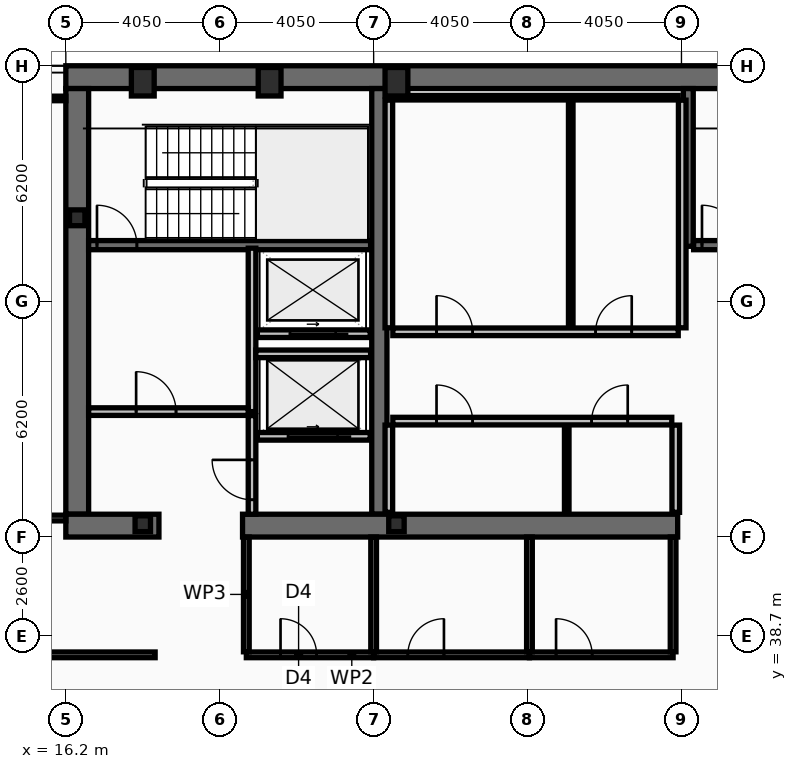
"""IFC4 building model, lengths in metres.
Left out: names, types, materials, properties, quantities, classifications, styles, units other than length and angle.
Written with IfcOpenShell. Run it as: python <this file> out.ifc"""

import sys

from ifc_helpers import new_model, si_unit, direction, frame, frame_2d, origin, origin_2d, place, context, subcontext, project, spatial, rectangle, hollow_rectangle, i_section, extrude, element, fill, save


model = new_model("IFC4")
c1 = context("Model", 3, precision=1e-05, world=origin(), true_north=direction((0.0, 1.0)))
c2 = subcontext(c1, "Body", "Model", "MODEL_VIEW")
j1 = project(units=[si_unit("LENGTHUNIT", "METRE"), si_unit("PLANEANGLEUNIT", "RADIAN")], contexts=[c1])
p1 = place(None, origin())
s1 = spatial("IfcSite", under=j1, at=p1, CompositionType="ELEMENT")
p2 = place(p1, origin())
s2 = spatial("IfcBuilding", under=s1, at=p2, CompositionType="ELEMENT")
p3 = place(p2, frame((0.0, 0.0, 221.0)))
s3 = spatial("IfcBuildingStorey", under=s2, at=p3, CompositionType="ELEMENT", Elevation=221.0)
p4 = place(p3, frame((16.2, 53.4, 0.0), z_axis=(0.0, 0.0, 1.0), x_axis=(1.0, 0.0, 0.0)))
e1 = element("IfcWall", 1, at=p4, inside=s3, PredefinedType="SHEAR", context=c2, shape_type="SweptSolid", body=[
    extrude(rectangle(XDim=40.5, YDim=0.6, at=frame_2d((20.25, 0.0))), origin(), (0.0, 0.0, 1.0), 3.44),
])
p5 = place(p3, frame((16.5, 41.9, 0.0), z_axis=(0.0, 0.0, 1.0), x_axis=(0.0, 1.0, 0.0)))
e2 = element("IfcWall", 2, at=p5, inside=s3, PredefinedType="SHEAR", context=c2, shape_type="SweptSolid", body=[
    extrude(rectangle(XDim=11.2, YDim=0.6, at=frame_2d((5.6, 0.0))), origin(), (0.0, 0.0, 1.0), 3.44),
])
p6 = place(p3, frame((24.45, 41.9, 0.0), z_axis=(0.0, 0.0, 1.0), x_axis=(0.0, 1.0, 0.0)))
e3 = element("IfcWall", 3, at=p6, inside=s3, PredefinedType="SHEAR", context=c2, shape_type="SweptSolid", body=[
    extrude(rectangle(XDim=11.2, YDim=0.4, at=frame_2d((5.6, 0.0))), origin(), (0.0, 0.0, 1.0), 3.44),
])
p7 = place(p3, frame((18.65, 41.6, 0.0), z_axis=(0.0, 0.0, 1.0), x_axis=(-1.0, 0.0, 0.0)))
e4 = element("IfcWall", 4, at=p7, inside=s3, PredefinedType="SHEAR", context=c2, shape_type="SweptSolid", body=[
    extrude(rectangle(XDim=2.45, YDim=0.6, at=frame_2d((1.225, 0.0))), origin(), (0.0, 0.0, 1.0), 3.44),
])
p8 = place(p3, frame((32.3, 41.6, 0.0), z_axis=(0.0, 0.0, 1.0), x_axis=(-1.0, 0.0, 0.0)))
e5 = element("IfcWall", 5, at=p8, inside=s3, PredefinedType="SHEAR", context=c2, shape_type="SweptSolid", body=[
    extrude(rectangle(XDim=11.45, YDim=0.6, at=frame_2d((5.725, 0.0))), origin(), (0.0, 0.0, 1.0), 3.44),
])
p9 = place(p3, frame((32.58, 48.95, 0.0), z_axis=(0.0, 0.0, 1.0), x_axis=(0.0, 1.0, 0.0)))
e6 = element("IfcWall", 6, at=p9, inside=s3, PredefinedType="SHEAR", context=c2, shape_type="SweptSolid", body=[
    extrude(rectangle(XDim=4.15, YDim=0.26, at=frame_2d((2.075, 0.0))), origin(), (0.0, 0.0, 1.0), 3.44),
])
p10 = place(p3, frame((16.8, 48.98, 0.0), z_axis=(0.0, 0.0, 1.0), x_axis=(1.0, 0.0, 0.0)))
e7 = element("IfcWall", 7, at=p10, inside=s3, PredefinedType="SHEAR", context=c2, shape_type="SweptSolid", body=[
    extrude(rectangle(XDim=7.42, YDim=0.24, at=frame_2d((3.71, 0.0))), origin(), (0.0, 0.0, 1.0), 3.44),
])
p11 = place(p10, frame((0.22, 0.0, 0.0)))
e8 = element("IfcOpeningElement", 8, at=p11, cuts=e7, PredefinedType="OPENING", context=c2, shape_type="SweptSolid", body=[
    extrude(rectangle(XDim=1.05, YDim=2.15, at=frame_2d((0.525, 1.075))), frame((0.0, 0.13, 0.0), z_axis=(0.0, -1.0, 0.0), x_axis=(1.0, 0.0, 0.0)), (0.0, 0.0, 1.0), 0.26),
])
p12 = place(p3, frame((32.72, 48.98, 0.0), z_axis=(0.0, 0.0, 1.0), x_axis=(1.0, 0.0, 0.0)))
e9 = element("IfcWall", 9, at=p12, inside=s3, PredefinedType="SHEAR", context=c2, shape_type="SweptSolid", body=[
    extrude(rectangle(XDim=7.56, YDim=0.24, at=frame_2d((3.78, 0.0))), origin(), (0.0, 0.0, 1.0), 3.44),
])
p13 = place(p12, frame((0.22, 0.0, 0.0)))
e10 = element("IfcOpeningElement", 10, at=p13, cuts=e9, PredefinedType="OPENING", context=c2, shape_type="SweptSolid", body=[
    extrude(rectangle(XDim=1.05, YDim=2.15, at=frame_2d((0.525, 1.075))), frame((0.0, 0.13, 0.0), z_axis=(0.0, -1.0, 0.0), x_axis=(1.0, 0.0, 0.0)), (0.0, 0.0, 1.0), 0.26),
])
for number, where, z_axis, x_axis in (
    (11, (18.225, 53.28, 0.0), (0.0, 0.0, 1.0), (1.0, 0.0, 0.0)),
    (12, (21.562, 53.28, 0.0), (0.0, 0.0, 1.0), (1.0, 0.0, 0.0)),
    (13, (24.9, 53.28, 0.0), (0.0, 0.0, 1.0), (1.0, 0.0, 0.0)),
):
    element("IfcColumn", number, at=place(p3, frame(where, z_axis=z_axis, x_axis=x_axis)), inside=s3, PredefinedType="COLUMN", context=c2, shape_type="SweptSolid", body=[
        extrude(hollow_rectangle(XDim=0.6, YDim=0.75, WallThickness=0.045, at=origin_2d()), origin(), (0.0, 0.0, 1.0), 3.6),
    ])
for number, where, z_axis, x_axis in (
    (14, (16.5, 49.7, 0.0), (0.0, 0.0, 1.0), (1.0, 0.0, 0.0)),
    (15, (18.225, 41.65, 0.0), (0.0, 0.0, 1.0), (1.0, 0.0, 0.0)),
    (16, (24.9, 41.65, 0.0), (0.0, 0.0, 1.0), (1.0, 0.0, 0.0)),
):
    element("IfcColumn", number, at=place(p3, frame(where, z_axis=z_axis, x_axis=x_axis)), inside=s3, PredefinedType="COLUMN", context=c2, shape_type="SweptSolid", body=[
        extrude(i_section(OverallWidth=0.406, OverallDepth=0.416, WebThickness=0.03, FlangeThickness=0.048, at=origin_2d()), origin(), (0.0, 0.0, 1.0), 3.6),
    ])
p14 = place(p3, frame((24.21, 43.95, 0.0), z_axis=(0.0, 0.0, 1.0), x_axis=(-1.0, 0.0, 0.0)))
e17 = element("IfcWall", 17, at=p14, inside=s3, PredefinedType="PARTITIONING", context=c2, shape_type="SweptSolid", body=[
    extrude(rectangle(XDim=2.97, YDim=0.2, at=frame_2d((1.485, 0.0))), origin(), (0.0, 0.0, 1.0), 3.44),
])
p15 = place(p14, frame((0.86, 0.0, 0.0)))
e18 = element("IfcOpeningElement", 18, at=p15, cuts=e17, PredefinedType="OPENING", context=c2, shape_type="SweptSolid", body=[
    extrude(rectangle(XDim=1.3, YDim=2.18, at=frame_2d((0.65, 1.09))), frame((0.0, 0.11, 0.0), z_axis=(0.0, -1.0, 0.0), x_axis=(1.0, 0.0, 0.0)), (0.0, 0.0, 1.0), 0.22),
])
p16 = place(p3, frame((24.21, 46.65, 0.0), z_axis=(0.0, 0.0, 1.0), x_axis=(-1.0, 0.0, 0.0)))
e19 = element("IfcWall", 19, at=p16, inside=s3, PredefinedType="PARTITIONING", context=c2, shape_type="SweptSolid", body=[
    extrude(rectangle(XDim=2.97, YDim=0.2, at=frame_2d((1.485, 0.0))), origin(), (0.0, 0.0, 1.0), 3.44),
])
p17 = place(p16, frame((0.91, 0.0, 0.0)))
e20 = element("IfcOpeningElement", 20, at=p17, cuts=e19, PredefinedType="OPENING", context=c2, shape_type="SweptSolid", body=[
    extrude(rectangle(XDim=1.2, YDim=2.18, at=frame_2d((0.6, 1.09))), frame((0.0, 0.11, 0.0), z_axis=(0.0, -1.0, 0.0), x_axis=(1.0, 0.0, 0.0)), (0.0, 0.0, 1.0), 0.22),
])
p18 = place(p3, frame((21.1, 44.6, 0.0), z_axis=(0.0, 0.0, 1.0), x_axis=(0.0, 1.0, 0.0)))
e21 = element("IfcWall", 21, at=p18, inside=s3, PredefinedType="PARTITIONING", context=c2, shape_type="SweptSolid", body=[
    extrude(rectangle(XDim=4.3, YDim=0.2, at=frame_2d((2.15, 0.0))), origin(), (0.0, 0.0, 1.0), 3.44),
])
p19 = place(p3, frame((16.8, 44.6, 0.0), z_axis=(0.0, 0.0, 1.0), x_axis=(1.0, 0.0, 0.0)))
e22 = element("IfcWall", 22, at=p19, inside=s3, PredefinedType="PARTITIONING", context=c2, shape_type="SweptSolid", body=[
    extrude(rectangle(XDim=4.2, YDim=0.2, at=frame_2d((2.1, 0.0))), origin(), (0.0, 0.0, 1.0), 3.44),
])
p20 = place(p19, frame((1.25, 0.0, 0.0)))
e23 = element("IfcOpeningElement", 23, at=p20, cuts=e22, PredefinedType="OPENING", context=c2, shape_type="SweptSolid", body=[
    extrude(rectangle(XDim=1.05, YDim=2.15, at=frame_2d((0.525, 1.075))), frame((0.0, 0.11, 0.0), z_axis=(0.0, -1.0, 0.0), x_axis=(1.0, 0.0, 0.0)), (0.0, 0.0, 1.0), 0.22),
])
p21 = place(p3, frame((21.2, 46.12, 0.0), z_axis=(0.0, 0.0, 1.0), x_axis=(1.0, 0.0, 0.0)))
e24 = element("IfcWall", 24, at=p21, inside=s3, PredefinedType="PARTITIONING", context=c2, shape_type="SweptSolid", body=[
    extrude(rectangle(XDim=3.02, YDim=0.2, at=frame_2d((1.51, 0.0))), origin(), (0.0, 0.0, 1.0), 3.44),
])
p22 = place(p3, frame((21.1, 41.9, 0.0), z_axis=(0.0, 0.0, 1.0), x_axis=(0.0, 1.0, 0.0)))
e25 = element("IfcWall", 25, at=p22, inside=s3, PredefinedType="PARTITIONING", context=c2, shape_type="SweptSolid", body=[
    extrude(rectangle(XDim=2.595, YDim=0.2, at=frame_2d((1.298, 0.0))), origin(), (0.0, 0.0, 1.0), 3.44),
])
p23 = place(p22, frame((0.38, 0.0, 0.0)))
e26 = element("IfcOpeningElement", 26, at=p23, cuts=e25, PredefinedType="OPENING", context=c2, shape_type="SweptSolid", body=[
    extrude(rectangle(XDim=1.05, YDim=2.15, at=frame_2d((0.525, 1.075))), frame((0.0, 0.11, 0.0), z_axis=(0.0, -1.0, 0.0), x_axis=(1.0, 0.0, 0.0)), (0.0, 0.0, 1.0), 0.22),
])
for number, where, z_axis, x_axis in (
    (27, (24.7, 46.805, 0.0), (0.0, 0.0, 1.0), (0.0, 1.0, 0.0)),
    (28, (32.42, 46.805, 0.0), (0.0, 0.0, 1.0), (0.0, 1.0, 0.0)),
):
    element("IfcWall", number, at=place(p3, frame(where, z_axis=z_axis, x_axis=x_axis)), inside=s3, PredefinedType="PARTITIONING", context=c2, shape_type="SweptSolid", body=[
        extrude(rectangle(XDim=5.99, YDim=0.2, at=frame_2d((2.995, 0.0))), origin(), (0.0, 0.0, 1.0), 3.44),
    ])
p24 = place(p3, frame((24.805, 52.86, 0.0), z_axis=(0.0, 0.0, 1.0), x_axis=(1.0, 0.0, 0.0)))
e29 = element("IfcWall", 29, at=p24, inside=s3, PredefinedType="PARTITIONING", context=c2, shape_type="SweptSolid", body=[
    extrude(rectangle(XDim=7.51, YDim=0.12, at=frame_2d((3.755, 0.0))), origin(), (0.0, 0.0, 1.0), 3.44),
])
p25 = place(p3, frame((29.486, 46.805, 0.0), z_axis=(0.0, 0.0, 1.0), x_axis=(0.0, 1.0, 0.0)))
e30 = element("IfcWall", 30, at=p25, inside=s3, PredefinedType="PARTITIONING", context=c2, shape_type="SweptSolid", body=[
    extrude(rectangle(XDim=5.99, YDim=0.12, at=frame_2d((2.995, 0.0))), origin(), (0.0, 0.0, 1.0), 3.44),
])
p26 = place(p3, frame((24.805, 46.7, 0.0), z_axis=(0.0, 0.0, 1.0), x_axis=(1.0, 0.0, 0.0)))
e31 = element("IfcWall", 31, at=p26, inside=s3, PredefinedType="PARTITIONING", context=c2, shape_type="SweptSolid", body=[
    extrude(rectangle(XDim=7.51, YDim=0.2, at=frame_2d((3.755, 0.0))), origin(), (0.0, 0.0, 1.0), 3.44),
])
p27 = place(p26, frame((1.15, 0.0, 0.0)))
e32 = element("IfcOpeningElement", 32, at=p27, cuts=e31, PredefinedType="OPENING", context=c2, shape_type="SweptSolid", body=[
    extrude(rectangle(XDim=0.95, YDim=2.1, at=frame_2d((0.475, 1.05))), frame((0.0, 0.11, 0.0), z_axis=(0.0, -1.0, 0.0), x_axis=(1.0, 0.0, 0.0)), (0.0, 0.0, 1.0), 0.22),
])
p28 = place(p26, frame((5.336, 0.0, 0.0)))
e33 = element("IfcOpeningElement", 33, at=p28, cuts=e31, PredefinedType="OPENING", context=c2, shape_type="SweptSolid", body=[
    extrude(rectangle(XDim=0.95, YDim=2.1, at=frame_2d((0.475, 1.05))), frame((0.0, 0.11, 0.0), z_axis=(0.0, -1.0, 0.0), x_axis=(1.0, 0.0, 0.0)), (0.0, 0.0, 1.0), 0.22),
])
for number, where, z_axis, x_axis in (
    (34, (24.7, 41.95, 0.0), (0.0, 0.0, 1.0), (0.0, 1.0, 0.0)),
    (35, (32.25, 41.95, 0.0), (0.0, 0.0, 1.0), (0.0, 1.0, 0.0)),
):
    element("IfcWall", number, at=place(p3, frame(where, z_axis=z_axis, x_axis=x_axis)), inside=s3, PredefinedType="PARTITIONING", context=c2, shape_type="SweptSolid", body=[
        extrude(rectangle(XDim=2.295, YDim=0.2, at=frame_2d((1.147, 0.0))), origin(), (0.0, 0.0, 1.0), 3.44),
    ])
p29 = place(p3, frame((29.381, 41.95, 0.0), z_axis=(0.0, 0.0, 1.0), x_axis=(0.0, 1.0, 0.0)))
e36 = element("IfcWall", 36, at=p29, inside=s3, PredefinedType="PARTITIONING", context=c2, shape_type="SweptSolid", body=[
    extrude(rectangle(XDim=2.295, YDim=0.12, at=frame_2d((1.147, 0.0))), origin(), (0.0, 0.0, 1.0), 3.44),
])
p30 = place(p3, frame((24.805, 44.35, 0.0), z_axis=(0.0, 0.0, 1.0), x_axis=(1.0, 0.0, 0.0)))
e37 = element("IfcWall", 37, at=p30, inside=s3, PredefinedType="PARTITIONING", context=c2, shape_type="SweptSolid", body=[
    extrude(rectangle(XDim=7.34, YDim=0.2, at=frame_2d((3.67, 0.0))), origin(), (0.0, 0.0, 1.0), 3.44),
])
p31 = place(p30, frame((1.15, 0.0, 0.0)))
e38 = element("IfcOpeningElement", 38, at=p31, cuts=e37, PredefinedType="OPENING", context=c2, shape_type="SweptSolid", body=[
    extrude(rectangle(XDim=0.95, YDim=2.1, at=frame_2d((0.475, 1.05))), frame((0.0, 0.11, 0.0), z_axis=(0.0, -1.0, 0.0), x_axis=(1.0, 0.0, 0.0)), (0.0, 0.0, 1.0), 0.22),
])
p32 = place(p30, frame((5.231, 0.0, 0.0)))
e39 = element("IfcOpeningElement", 39, at=p32, cuts=e37, PredefinedType="OPENING", context=c2, shape_type="SweptSolid", body=[
    extrude(rectangle(XDim=0.95, YDim=2.1, at=frame_2d((0.475, 1.05))), frame((0.0, 0.11, 0.0), z_axis=(0.0, -1.0, 0.0), x_axis=(1.0, 0.0, 0.0)), (0.0, 0.0, 1.0), 0.22),
])
p33 = place(p3, frame((20.95, 38.2, 0.0), z_axis=(0.0, 0.0, 1.0), x_axis=(1.0, 0.0, 0.0)))
e40 = element("IfcWall", 40, at=p33, inside=s3, PredefinedType="PARTITIONING", context=c2, shape_type="SweptSolid", body=[
    extrude(rectangle(XDim=3.35, YDim=0.15, at=frame_2d((1.675, 0.0))), origin(), (0.0, 0.0, 1.0), 3.44),
])
p34 = place(p33, frame((0.9, 0.0, 0.0)))
e41 = element("IfcOpeningElement", 41, at=p34, cuts=e40, PredefinedType="OPENING", context=c2, shape_type="SweptSolid", body=[
    extrude(rectangle(XDim=0.95, YDim=2.05, at=frame_2d((0.475, 1.025))), frame((0.0, 0.085, 0.0), z_axis=(0.0, -1.0, 0.0), x_axis=(1.0, 0.0, 0.0)), (0.0, 0.0, 1.0), 0.17),
])
p35 = place(p3, frame((24.3, 38.2, 0.0), z_axis=(0.0, 0.0, 1.0), x_axis=(1.0, 0.0, 0.0)))
e42 = element("IfcWall", 42, at=p35, inside=s3, PredefinedType="PARTITIONING", context=c2, shape_type="SweptSolid", body=[
    extrude(rectangle(XDim=4.1, YDim=0.15, at=frame_2d((2.05, 0.0))), origin(), (0.0, 0.0, 1.0), 2.78),
])
p36 = place(p35, frame((0.9, 0.0, 0.0)))
e43 = element("IfcOpeningElement", 43, at=p36, cuts=e42, PredefinedType="OPENING", context=c2, shape_type="SweptSolid", body=[
    extrude(rectangle(XDim=0.95, YDim=2.05, at=frame_2d((0.475, 1.025))), frame((0.0, 0.085, 0.0), z_axis=(0.0, -1.0, 0.0), x_axis=(1.0, 0.0, 0.0)), (0.0, 0.0, 1.0), 0.17),
])
p37 = place(p3, frame((28.4, 38.2, 0.0), z_axis=(0.0, 0.0, 1.0), x_axis=(1.0, 0.0, 0.0)))
e44 = element("IfcWall", 44, at=p37, inside=s3, PredefinedType="PARTITIONING", context=c2, shape_type="SweptSolid", body=[
    extrude(rectangle(XDim=3.78, YDim=0.15, at=frame_2d((1.89, 0.0))), origin(), (0.0, 0.0, 1.0), 2.78),
])
p38 = place(p37, frame((0.7, 0.0, 0.0)))
e45 = element("IfcOpeningElement", 45, at=p38, cuts=e44, PredefinedType="OPENING", context=c2, shape_type="SweptSolid", body=[
    extrude(rectangle(XDim=0.95, YDim=2.05, at=frame_2d((0.475, 1.025))), frame((0.0, 0.085, 0.0), z_axis=(0.0, -1.0, 0.0), x_axis=(1.0, 0.0, 0.0)), (0.0, 0.0, 1.0), 0.17),
])
for number, where, z_axis, x_axis in (
    (46, (20.95, 38.28, 0.0), (0.0, 0.0, 1.0), (0.0, 1.0, 0.0)),
    (47, (24.3, 38.28, 0.0), (0.0, 0.0, 1.0), (0.0, 1.0, 0.0)),
    (48, (28.4, 38.28, 0.0), (0.0, 0.0, 1.0), (0.0, 1.0, 0.0)),
    (49, (32.18, 38.28, 0.0), (0.0, 0.0, 1.0), (0.0, 1.0, 0.0)),
):
    element("IfcWall", number, at=place(p3, frame(where, z_axis=z_axis, x_axis=x_axis)), inside=s3, PredefinedType="PARTITIONING", context=c2, shape_type="SweptSolid", body=[
        extrude(rectangle(XDim=3.02, YDim=0.15, at=frame_2d((1.51, 0.0))), origin(), (0.0, 0.0, 1.0), 3.44),
    ])
p39 = place(p3, frame((8.03, 38.2, 0.0), z_axis=(0.0, 0.0, 1.0), x_axis=(1.0, 0.0, 0.0)))
e50 = element("IfcWall", 50, at=p39, inside=s3, PredefinedType="PARTITIONING", context=c2, shape_type="SweptSolid", body=[
    extrude(rectangle(XDim=10.52, YDim=0.15, at=frame_2d((5.26, 0.0))), origin(), (0.0, 0.0, 1.0), 2.78),
])
p40 = place(p39, frame((6.32, 0.0, 0.0)))
e51 = element("IfcOpeningElement", 51, at=p40, cuts=e50, PredefinedType="OPENING", context=c2, shape_type="SweptSolid", body=[
    extrude(rectangle(XDim=0.95, YDim=2.05, at=frame_2d((0.475, 1.025))), frame((0.0, 0.085, 0.0), z_axis=(0.0, -1.0, 0.0), x_axis=(1.0, 0.0, 0.0)), (0.0, 0.0, 1.0), 0.17),
])
p41 = place(p3, frame((8.095, 41.8, 0.0), z_axis=(0.0, 0.0, 1.0), x_axis=(1.0, 0.0, 0.0)))
e52 = element("IfcWall", 52, at=p41, inside=s3, PredefinedType="PARTITIONING", context=c2, shape_type="SweptSolid", body=[
    extrude(rectangle(XDim=8.105, YDim=0.15, at=frame_2d((4.052, 0.0))), origin(), (0.0, 0.0, 1.0), 3.44),
])
p42 = place(p41, frame((6.32, 0.0, 0.0)))
e53 = element("IfcOpeningElement", 53, at=p42, cuts=e52, PredefinedType="OPENING", context=c2, shape_type="SweptSolid", body=[
    extrude(rectangle(XDim=0.9, YDim=2.05, at=frame_2d((0.45, 1.025))), frame((0.0, 0.085, 0.0), z_axis=(0.0, -1.0, 0.0), x_axis=(1.0, 0.0, 0.0)), (0.0, 0.0, 1.0), 0.17),
])
p43 = place(p3, frame((8.095, 52.84, 0.0), z_axis=(0.0, 0.0, 1.0), x_axis=(1.0, 0.0, 0.0)))
e54 = element("IfcWall", 54, at=p43, inside=s3, PredefinedType="PARTITIONING", context=c2, shape_type="SweptSolid", body=[
    extrude(rectangle(XDim=8.105, YDim=0.12, at=frame_2d((4.052, 0.0))), origin(), (0.0, 0.0, 1.0), 3.44),
])
p44 = place(p11, origin())
e55 = element("IfcDoor", 55, at=p44, inside=s3, OperationType="SINGLE_SWING_LEFT", PredefinedType="DOOR", context=c2, shape_type="SweptSolid", body=[
    extrude(rectangle(XDim=1.05, YDim=2.15, at=frame_2d((0.525, 1.075))), frame((0.0, 0.025, 0.0), z_axis=(0.0, -1.0, 0.0), x_axis=(1.0, 0.0, 0.0)), (0.0, 0.0, 1.0), 0.05),
])
fill(e8, e55)
p45 = place(p13, origin())
e56 = element("IfcDoor", 56, at=p45, inside=s3, OperationType="SINGLE_SWING_LEFT", PredefinedType="DOOR", context=c2, shape_type="SweptSolid", body=[
    extrude(rectangle(XDim=1.05, YDim=2.15, at=frame_2d((0.525, 1.075))), frame((0.0, 0.025, 0.0), z_axis=(0.0, -1.0, 0.0), x_axis=(1.0, 0.0, 0.0)), (0.0, 0.0, 1.0), 0.05),
])
fill(e10, e56)
p46 = place(p15, origin())
e57 = element("IfcDoor", 57, at=p46, inside=s3, OperationType="SLIDING_TO_LEFT", PredefinedType="DOOR", context=c2, shape_type="SweptSolid", body=[
    extrude(rectangle(XDim=1.3, YDim=2.18, at=frame_2d((0.65, 1.09))), frame((0.0, 0.025, 0.0), z_axis=(0.0, -1.0, 0.0), x_axis=(1.0, 0.0, 0.0)), (0.0, 0.0, 1.0), 0.05),
])
fill(e18, e57)
p47 = place(p17, origin())
e58 = element("IfcDoor", 58, at=p47, inside=s3, OperationType="SLIDING_TO_LEFT", PredefinedType="DOOR", context=c2, shape_type="SweptSolid", body=[
    extrude(rectangle(XDim=1.2, YDim=2.18, at=frame_2d((0.6, 1.09))), frame((0.0, 0.025, 0.0), z_axis=(0.0, -1.0, 0.0), x_axis=(1.0, 0.0, 0.0)), (0.0, 0.0, 1.0), 0.05),
])
fill(e20, e58)
p48 = place(p20, origin())
e59 = element("IfcDoor", 59, at=p48, inside=s3, OperationType="SINGLE_SWING_LEFT", PredefinedType="DOOR", context=c2, shape_type="SweptSolid", body=[
    extrude(rectangle(XDim=1.05, YDim=2.15, at=frame_2d((0.525, 1.075))), frame((0.0, 0.025, 0.0), z_axis=(0.0, -1.0, 0.0), x_axis=(1.0, 0.0, 0.0)), (0.0, 0.0, 1.0), 0.05),
])
fill(e23, e59)
p49 = place(p23, origin())
e60 = element("IfcDoor", 60, at=p49, inside=s3, OperationType="SINGLE_SWING_RIGHT", PredefinedType="DOOR", context=c2, shape_type="SweptSolid", body=[
    extrude(rectangle(XDim=1.05, YDim=2.15, at=frame_2d((0.525, 1.075))), frame((0.0, 0.025, 0.0), z_axis=(0.0, -1.0, 0.0), x_axis=(1.0, 0.0, 0.0)), (0.0, 0.0, 1.0), 0.05),
])
fill(e26, e60)
p50 = place(p27, origin())
e61 = element("IfcDoor", 61, at=p50, inside=s3, OperationType="SINGLE_SWING_LEFT", PredefinedType="DOOR", context=c2, shape_type="SweptSolid", body=[
    extrude(rectangle(XDim=0.95, YDim=2.1, at=frame_2d((0.475, 1.05))), frame((0.0, 0.025, 0.0), z_axis=(0.0, -1.0, 0.0), x_axis=(1.0, 0.0, 0.0)), (0.0, 0.0, 1.0), 0.05),
])
fill(e32, e61)
p51 = place(p28, origin())
e62 = element("IfcDoor", 62, at=p51, inside=s3, OperationType="SINGLE_SWING_RIGHT", PredefinedType="DOOR", context=c2, shape_type="SweptSolid", body=[
    extrude(rectangle(XDim=0.95, YDim=2.1, at=frame_2d((0.475, 1.05))), frame((0.0, 0.025, 0.0), z_axis=(0.0, -1.0, 0.0), x_axis=(1.0, 0.0, 0.0)), (0.0, 0.0, 1.0), 0.05),
])
fill(e33, e62)
p52 = place(p31, origin())
e63 = element("IfcDoor", 63, at=p52, inside=s3, OperationType="SINGLE_SWING_LEFT", PredefinedType="DOOR", context=c2, shape_type="SweptSolid", body=[
    extrude(rectangle(XDim=0.95, YDim=2.1, at=frame_2d((0.475, 1.05))), frame((0.0, 0.025, 0.0), z_axis=(0.0, -1.0, 0.0), x_axis=(1.0, 0.0, 0.0)), (0.0, 0.0, 1.0), 0.05),
])
fill(e38, e63)
p53 = place(p32, origin())
e64 = element("IfcDoor", 64, at=p53, inside=s3, OperationType="SINGLE_SWING_RIGHT", PredefinedType="DOOR", context=c2, shape_type="SweptSolid", body=[
    extrude(rectangle(XDim=0.95, YDim=2.1, at=frame_2d((0.475, 1.05))), frame((0.0, 0.025, 0.0), z_axis=(0.0, -1.0, 0.0), x_axis=(1.0, 0.0, 0.0)), (0.0, 0.0, 1.0), 0.05),
])
fill(e39, e64)
p54 = place(p34, origin())
e65 = element("IfcDoor", 65, at=p54, inside=s3, OperationType="SINGLE_SWING_LEFT", PredefinedType="DOOR", context=c2, shape_type="SweptSolid", body=[
    extrude(rectangle(XDim=0.95, YDim=2.05, at=frame_2d((0.475, 1.025))), frame((0.0, 0.025, 0.0), z_axis=(0.0, -1.0, 0.0), x_axis=(1.0, 0.0, 0.0)), (0.0, 0.0, 1.0), 0.05),
])
fill(e41, e65)
p55 = place(p36, origin())
e66 = element("IfcDoor", 66, at=p55, inside=s3, OperationType="SINGLE_SWING_RIGHT", PredefinedType="DOOR", context=c2, shape_type="SweptSolid", body=[
    extrude(rectangle(XDim=0.95, YDim=2.05, at=frame_2d((0.475, 1.025))), frame((0.0, 0.025, 0.0), z_axis=(0.0, -1.0, 0.0), x_axis=(1.0, 0.0, 0.0)), (0.0, 0.0, 1.0), 0.05),
])
fill(e43, e66)
p56 = place(p38, origin())
e67 = element("IfcDoor", 67, at=p56, inside=s3, OperationType="SINGLE_SWING_LEFT", PredefinedType="DOOR", context=c2, shape_type="SweptSolid", body=[
    extrude(rectangle(XDim=0.95, YDim=2.05, at=frame_2d((0.475, 1.025))), frame((0.0, 0.025, 0.0), z_axis=(0.0, -1.0, 0.0), x_axis=(1.0, 0.0, 0.0)), (0.0, 0.0, 1.0), 0.05),
])
fill(e45, e67)
save(model, sys.argv[1])
